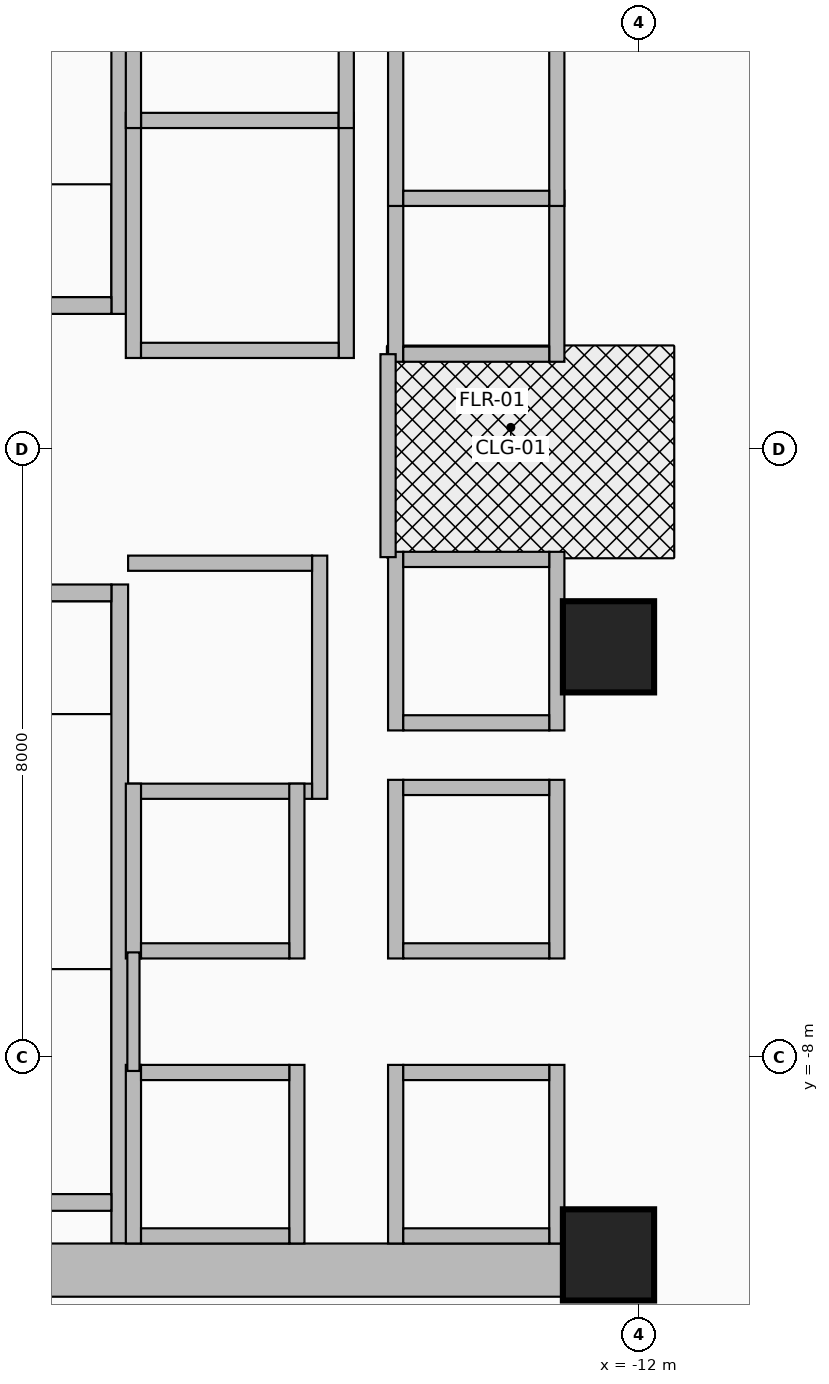
"""IFC4 building model, lengths in metres.
Left out: names, types, materials, properties, quantities, classifications, styles, units other than length and angle.
Written with IfcOpenShell. Run it as: python <this file> out.ifc"""

import sys

from ifc_helpers import new_model, si_unit, direction, frame, frame_2d, origin, origin_2d, place, context, subcontext, project, spatial, rectangle, extrude, source, transform, mapped, element, fill, save


model = new_model("IFC4")
c1 = context("Model", 3, precision=1e-05, world=origin(), true_north=direction((0.0, 1.0)))
c2 = subcontext(c1, "Body", "Model", "MODEL_VIEW")
j1 = project(units=[si_unit("LENGTHUNIT", "METRE"), si_unit("PLANEANGLEUNIT", "RADIAN")], contexts=[c1])
p1 = place(None, origin())
s1 = spatial("IfcSite", under=j1, at=p1, CompositionType="ELEMENT")
p2 = place(p1, origin())
s2 = spatial("IfcBuilding", under=s1, at=p2, CompositionType="ELEMENT")
p3 = place(p2, frame((0.0, 0.0, 101.1)))
s3 = spatial("IfcBuildingStorey", under=s2, at=p3, CompositionType="ELEMENT", Elevation=101.1)
p4 = place(p3, frame((-18.83, 1.78, 0.0), z_axis=(0.0, 0.0, 1.0), x_axis=(0.0, 1.0, 0.0)))
e1 = element("IfcWall", 1, at=p4, inside=s3, PredefinedType="SHEAR", context=c2, shape_type="SweptSolid", body=[
    extrude(rectangle(XDim=8.67, YDim=0.22, at=frame_2d((4.335, 0.0))), origin(), (0.0, 0.0, 1.0), 4.36),
])
p5 = place(p3, frame((-22.05, 1.89, 0.0), z_axis=(0.0, 0.0, 1.0), x_axis=(1.0, 0.0, 0.0)))
e2 = element("IfcWall", 2, at=p5, inside=s3, PredefinedType="SHEAR", context=c2, shape_type="SweptSolid", body=[
    extrude(rectangle(XDim=3.11, YDim=0.22, at=frame_2d((1.555, 0.0))), origin(), (0.0, 0.0, 1.0), 4.36),
])
p6 = place(p5, frame((1.0, 0.0, 0.0)))
e3 = element("IfcOpeningElement", 3, at=p6, cuts=e2, PredefinedType="OPENING", context=c2, shape_type="SweptSolid", body=[
    extrude(rectangle(XDim=1.1, YDim=2.15, at=frame_2d((0.55, 1.075))), frame((0.0, 0.125, 0.0), z_axis=(0.0, -1.0, 0.0), x_axis=(1.0, 0.0, 0.0)), (0.0, 0.0, 1.0), 0.25),
])
p7 = place(p3, frame((-18.83, -10.45, 0.0), z_axis=(0.0, 0.0, 1.0), x_axis=(0.0, 1.0, 0.0)))
e4 = element("IfcWall", 4, at=p7, inside=s3, PredefinedType="SHEAR", context=c2, shape_type="SweptSolid", body=[
    extrude(rectangle(XDim=8.67, YDim=0.22, at=frame_2d((4.335, 0.0))), origin(), (0.0, 0.0, 1.0), 4.36),
])
p8 = place(p3, frame((-22.05, -9.91, 0.0), z_axis=(0.0, 0.0, 1.0), x_axis=(1.0, 0.0, 0.0)))
e5 = element("IfcWall", 5, at=p8, inside=s3, PredefinedType="SHEAR", context=c2, shape_type="SweptSolid", body=[
    extrude(rectangle(XDim=3.11, YDim=0.22, at=frame_2d((1.555, 0.0))), origin(), (0.0, 0.0, 1.0), 4.36),
])
p9 = place(p3, frame((-22.05, -1.89, 0.0), z_axis=(0.0, 0.0, 1.0), x_axis=(1.0, 0.0, 0.0)))
e6 = element("IfcWall", 6, at=p9, inside=s3, PredefinedType="SHEAR", context=c2, shape_type="SweptSolid", body=[
    extrude(rectangle(XDim=3.11, YDim=0.22, at=frame_2d((1.555, 0.0))), origin(), (0.0, 0.0, 1.0), 4.36),
])
p10 = place(p9, frame((1.0, 0.0, 0.0)))
e7 = element("IfcOpeningElement", 7, at=p10, cuts=e6, PredefinedType="OPENING", context=c2, shape_type="SweptSolid", body=[
    extrude(rectangle(XDim=1.1, YDim=2.15, at=frame_2d((0.55, 1.075))), frame((0.0, 0.125, 0.0), z_axis=(0.0, -1.0, 0.0), x_axis=(1.0, 0.0, 0.0)), (0.0, 0.0, 1.0), 0.25),
])
p11 = place(p3, frame((-22.65, -10.8, 0.0), z_axis=(0.0, 0.0, 1.0), x_axis=(1.0, 0.0, 0.0)))
e8 = element("IfcWall", 8, at=p11, inside=s3, PredefinedType="SHEAR", context=c2, shape_type="SweptSolid", body=[
    extrude(rectangle(XDim=10.25, YDim=0.7, at=frame_2d((5.125, 0.0))), origin(), (0.0, 0.0, 1.0), 4.36),
])
m1 = source(origin(), c2, "Body", "SweptSolid", [
    extrude(rectangle(XDim=1.2, YDim=1.2, at=origin_2d()), origin(), (0.0, 0.0, 1.0), 4.6),
])
for number, where, z_axis, x_axis in (
    (9, (-12.4, -10.6, 0.0), (0.0, 0.0, 1.0), (1.0, 0.0, 0.0)),
    (10, (-12.4, -2.6, 0.0), (0.0, 0.0, 1.0), (1.0, 0.0, 0.0)),
):
    element("IfcColumn", number, at=place(p3, frame(where, z_axis=z_axis, x_axis=x_axis)), inside=s3, PredefinedType="COLUMN", context=c2, shape_type="MappedRepresentation", body=[
        mapped(m1, transform((0.0, 0.0, 0.0), x_axis=(1.0, 0.0, 0.0), y_axis=(0.0, 1.0, 0.0), z_axis=(0.0, 0.0, 1.0), scale=1.0)),
    ])
for number, where, z_axis, x_axis in (
    (11, (-18.65, 1.2, 0.0), (0.0, 0.0, 1.0), (0.0, 1.0, 0.0)),
    (12, (-15.85, 1.2, 0.0), (0.0, 0.0, 1.0), (0.0, 1.0, 0.0)),
):
    element("IfcWall", number, at=place(p3, frame(where, z_axis=z_axis, x_axis=x_axis)), inside=s3, PredefinedType="MOVABLE", context=c2, shape_type="SweptSolid", body=[
        extrude(rectangle(XDim=3.225, YDim=0.2, at=frame_2d((1.613, 0.0))), origin(), (0.0, 0.0, 1.0), 4.36),
    ])
p12 = place(p3, frame((-18.55, 1.3, 0.0), z_axis=(0.0, 0.0, 1.0), x_axis=(1.0, 0.0, 0.0)))
e13 = element("IfcWall", 13, at=p12, inside=s3, PredefinedType="MOVABLE", context=c2, shape_type="SweptSolid", body=[
    extrude(rectangle(XDim=2.6, YDim=0.2, at=frame_2d((1.3, 0.0))), origin(), (0.0, 0.0, 1.0), 4.36),
])
p13 = place(p12, frame((0.7, 0.0, 0.0)))
e14 = element("IfcOpeningElement", 14, at=p13, cuts=e13, PredefinedType="OPENING", context=c2, shape_type="SweptSolid", body=[
    extrude(rectangle(XDim=1.2, YDim=2.1, at=frame_2d((0.6, 1.05))), frame((0.0, 0.115, 0.0), z_axis=(0.0, -1.0, 0.0), x_axis=(1.0, 0.0, 0.0)), (0.0, 0.0, 1.0), 0.23),
])
p14 = place(p3, frame((-18.55, 4.325, 0.0), z_axis=(0.0, 0.0, 1.0), x_axis=(1.0, 0.0, 0.0)))
e15 = element("IfcWall", 15, at=p14, inside=s3, PredefinedType="MOVABLE", context=c2, shape_type="SweptSolid", body=[
    extrude(rectangle(XDim=2.6, YDim=0.2, at=frame_2d((1.3, 0.0))), origin(), (0.0, 0.0, 1.0), 4.36),
])
p15 = place(p3, frame((-16.2, -4.6, 0.0), z_axis=(0.0, 0.0, 1.0), x_axis=(0.0, 1.0, 0.0)))
e16 = element("IfcWall", 16, at=p15, inside=s3, PredefinedType="MOVABLE", context=c2, shape_type="SweptSolid", body=[
    extrude(rectangle(XDim=3.2, YDim=0.2, at=frame_2d((1.6, 0.0))), origin(), (0.0, 0.0, 1.0), 4.36),
])
p16 = place(p3, frame((-18.72, -4.5, 0.0), z_axis=(0.0, 0.0, 1.0), x_axis=(1.0, 0.0, 0.0)))
e17 = element("IfcWall", 17, at=p16, inside=s3, PredefinedType="MOVABLE", context=c2, shape_type="SweptSolid", body=[
    extrude(rectangle(XDim=2.42, YDim=0.2, at=frame_2d((1.21, 0.0))), origin(), (0.0, 0.0, 1.0), 4.36),
])
p17 = place(p3, frame((-18.72, -1.5, 0.0), z_axis=(0.0, 0.0, 1.0), x_axis=(1.0, 0.0, 0.0)))
e18 = element("IfcWall", 18, at=p17, inside=s3, PredefinedType="MOVABLE", context=c2, shape_type="SweptSolid", body=[
    extrude(rectangle(XDim=2.42, YDim=0.2, at=frame_2d((1.21, 0.0))), origin(), (0.0, 0.0, 1.0), 4.36),
])
p18 = place(p17, frame((0.61, 0.0, 0.0)))
e19 = element("IfcOpeningElement", 19, at=p18, cuts=e18, PredefinedType="OPENING", context=c2, shape_type="SweptSolid", body=[
    extrude(rectangle(XDim=1.2, YDim=2.1, at=frame_2d((0.6, 1.05))), frame((0.0, 0.115, 0.0), z_axis=(0.0, -1.0, 0.0), x_axis=(1.0, 0.0, 0.0)), (0.0, 0.0, 1.0), 0.23),
])
for number, where, z_axis, x_axis in (
    (20, (-18.65, 4.225, 0.0), (0.0, 0.0, 1.0), (0.0, 1.0, 0.0)),
    (21, (-15.85, 4.225, 0.0), (0.0, 0.0, 1.0), (0.0, 1.0, 0.0)),
):
    element("IfcWall", number, at=place(p3, frame(where, z_axis=z_axis, x_axis=x_axis)), inside=s3, PredefinedType="MOVABLE", context=c2, shape_type="SweptSolid", body=[
        extrude(rectangle(XDim=3.325, YDim=0.2, at=frame_2d((1.663, 0.0))), origin(), (0.0, 0.0, 1.0), 4.36),
    ])
for number, where, z_axis, x_axis in (
    (22, (-15.2, -10.45, 0.0), (0.0, 0.0, 1.0), (0.0, 1.0, 0.0)),
    (23, (-13.08, -10.45, 0.0), (0.0, 0.0, 1.0), (0.0, 1.0, 0.0)),
):
    element("IfcWall", number, at=place(p3, frame(where, z_axis=z_axis, x_axis=x_axis)), inside=s3, PredefinedType="MOVABLE", context=c2, shape_type="SweptSolid", body=[
        extrude(rectangle(XDim=2.35, YDim=0.2, at=frame_2d((1.175, 0.0))), origin(), (0.0, 0.0, 1.0), 3.566),
    ])
p19 = place(p3, frame((-15.1, -10.35, 0.0), z_axis=(0.0, 0.0, 1.0), x_axis=(1.0, 0.0, 0.0)))
e24 = element("IfcWall", 24, at=p19, inside=s3, PredefinedType="MOVABLE", context=c2, shape_type="SweptSolid", body=[
    extrude(rectangle(XDim=1.92, YDim=0.2, at=frame_2d((0.96, 0.0))), origin(), (0.0, 0.0, 1.0), 3.566),
])
p20 = place(p3, frame((-15.1, -8.2, 0.0), z_axis=(0.0, 0.0, 1.0), x_axis=(1.0, 0.0, 0.0)))
e25 = element("IfcWall", 25, at=p20, inside=s3, PredefinedType="MOVABLE", context=c2, shape_type="SweptSolid", body=[
    extrude(rectangle(XDim=1.92, YDim=0.2, at=frame_2d((0.96, 0.0))), origin(), (0.0, 0.0, 1.0), 4.36),
])
p21 = place(p20, frame((0.41, 0.0, 0.0)))
e26 = element("IfcOpeningElement", 26, at=p21, cuts=e25, PredefinedType="OPENING", context=c2, shape_type="SweptSolid", body=[
    extrude(rectangle(XDim=1.1, YDim=2.1, at=frame_2d((0.55, 1.05))), frame((0.0, 0.115, 0.0), z_axis=(0.0, -1.0, 0.0), x_axis=(1.0, 0.0, 0.0)), (0.0, 0.0, 1.0), 0.23),
])
for number, where, z_axis, x_axis in (
    (27, (-15.2, -6.7, 0.0), (0.0, 0.0, 1.0), (0.0, 1.0, 0.0)),
    (28, (-13.08, -6.7, 0.0), (0.0, 0.0, 1.0), (0.0, 1.0, 0.0)),
):
    element("IfcWall", number, at=place(p3, frame(where, z_axis=z_axis, x_axis=x_axis)), inside=s3, PredefinedType="MOVABLE", context=c2, shape_type="SweptSolid", body=[
        extrude(rectangle(XDim=2.35, YDim=0.2, at=frame_2d((1.175, 0.0))), origin(), (0.0, 0.0, 1.0), 4.36),
    ])
p22 = place(p3, frame((-15.1, -6.6, 0.0), z_axis=(0.0, 0.0, 1.0), x_axis=(1.0, 0.0, 0.0)))
e29 = element("IfcWall", 29, at=p22, inside=s3, PredefinedType="MOVABLE", context=c2, shape_type="SweptSolid", body=[
    extrude(rectangle(XDim=1.92, YDim=0.2, at=frame_2d((0.96, 0.0))), origin(), (0.0, 0.0, 1.0), 4.36),
])
p23 = place(p22, frame((0.41, 0.0, 0.0)))
e30 = element("IfcOpeningElement", 30, at=p23, cuts=e29, PredefinedType="OPENING", context=c2, shape_type="SweptSolid", body=[
    extrude(rectangle(XDim=1.1, YDim=2.1, at=frame_2d((0.55, 1.05))), frame((0.0, 0.115, 0.0), z_axis=(0.0, -1.0, 0.0), x_axis=(1.0, 0.0, 0.0)), (0.0, 0.0, 1.0), 0.23),
])
p24 = place(p3, frame((-15.1, -4.45, 0.0), z_axis=(0.0, 0.0, 1.0), x_axis=(1.0, 0.0, 0.0)))
e31 = element("IfcWall", 31, at=p24, inside=s3, PredefinedType="MOVABLE", context=c2, shape_type="SweptSolid", body=[
    extrude(rectangle(XDim=1.92, YDim=0.2, at=frame_2d((0.96, 0.0))), origin(), (0.0, 0.0, 1.0), 4.36),
])
for number, where, z_axis, x_axis in (
    (32, (-18.65, -10.45, 0.0), (0.0, 0.0, 1.0), (0.0, 1.0, 0.0)),
    (33, (-16.5, -10.45, 0.0), (0.0, 0.0, 1.0), (0.0, 1.0, 0.0)),
):
    element("IfcWall", number, at=place(p3, frame(where, z_axis=z_axis, x_axis=x_axis)), inside=s3, PredefinedType="MOVABLE", context=c2, shape_type="SweptSolid", body=[
        extrude(rectangle(XDim=2.35, YDim=0.2, at=frame_2d((1.175, 0.0))), origin(), (0.0, 0.0, 1.0), 3.566),
    ])
p25 = place(p3, frame((-18.55, -10.35, 0.0), z_axis=(0.0, 0.0, 1.0), x_axis=(1.0, 0.0, 0.0)))
e34 = element("IfcWall", 34, at=p25, inside=s3, PredefinedType="MOVABLE", context=c2, shape_type="SweptSolid", body=[
    extrude(rectangle(XDim=1.95, YDim=0.2, at=frame_2d((0.975, 0.0))), origin(), (0.0, 0.0, 1.0), 3.566),
])
p26 = place(p3, frame((-18.55, -8.2, 0.0), z_axis=(0.0, 0.0, 1.0), x_axis=(1.0, 0.0, 0.0)))
e35 = element("IfcWall", 35, at=p26, inside=s3, PredefinedType="MOVABLE", context=c2, shape_type="SweptSolid", body=[
    extrude(rectangle(XDim=1.95, YDim=0.2, at=frame_2d((0.975, 0.0))), origin(), (0.0, 0.0, 1.0), 4.36),
])
p27 = place(p26, frame((0.425, 0.0, 0.0)))
e36 = element("IfcOpeningElement", 36, at=p27, cuts=e35, PredefinedType="OPENING", context=c2, shape_type="SweptSolid", body=[
    extrude(rectangle(XDim=1.1, YDim=2.1, at=frame_2d((0.55, 1.05))), frame((0.0, 0.115, 0.0), z_axis=(0.0, -1.0, 0.0), x_axis=(1.0, 0.0, 0.0)), (0.0, 0.0, 1.0), 0.23),
])
p28 = place(p3, frame((-15.2, 1.15, 0.0), z_axis=(0.0, 0.0, 1.0), x_axis=(0.0, 1.0, 0.0)))
e37 = element("IfcWall", 37, at=p28, inside=s3, PredefinedType="MOVABLE", context=c2, shape_type="SweptSolid", body=[
    extrude(rectangle(XDim=2.25, YDim=0.2, at=frame_2d((1.125, 0.0))), origin(), (0.0, 0.0, 1.0), 4.36),
])
p29 = place(p3, frame((-13.08, 1.15, 0.0), z_axis=(0.0, 0.0, 1.0), x_axis=(0.0, 1.0, 0.0)))
e38 = element("IfcWall", 38, at=p29, inside=s3, PredefinedType="MOVABLE", context=c2, shape_type="SweptSolid", body=[
    extrude(rectangle(XDim=2.25, YDim=0.2, at=frame_2d((1.125, 0.0))), origin(), (0.0, 0.0, 1.0), 4.36),
])
p30 = place(p29, frame((0.575, 0.0, 0.0)))
e39 = element("IfcOpeningElement", 39, at=p30, cuts=e38, PredefinedType="OPENING", context=c2, shape_type="SweptSolid", body=[
    extrude(rectangle(XDim=1.1, YDim=2.1, at=frame_2d((0.55, 1.05))), frame((0.0, 0.115, 0.0), z_axis=(0.0, -1.0, 0.0), x_axis=(1.0, 0.0, 0.0)), (0.0, 0.0, 1.0), 0.23),
])
p31 = place(p3, frame((-15.1, 1.25, 0.0), z_axis=(0.0, 0.0, 1.0), x_axis=(1.0, 0.0, 0.0)))
e40 = element("IfcWall", 40, at=p31, inside=s3, PredefinedType="MOVABLE", context=c2, shape_type="SweptSolid", body=[
    extrude(rectangle(XDim=1.92, YDim=0.2, at=frame_2d((0.96, 0.0))), origin(), (0.0, 0.0, 1.0), 4.36),
])
p32 = place(p3, frame((-15.2, 3.2, 0.0), z_axis=(0.0, 0.0, 1.0), x_axis=(0.0, 1.0, 0.0)))
e41 = element("IfcWall", 41, at=p32, inside=s3, PredefinedType="MOVABLE", context=c2, shape_type="SweptSolid", body=[
    extrude(rectangle(XDim=2.25, YDim=0.2, at=frame_2d((1.125, 0.0))), origin(), (0.0, 0.0, 1.0), 4.36),
])
p33 = place(p3, frame((-13.08, 3.2, 0.0), z_axis=(0.0, 0.0, 1.0), x_axis=(0.0, 1.0, 0.0)))
e42 = element("IfcWall", 42, at=p33, inside=s3, PredefinedType="MOVABLE", context=c2, shape_type="SweptSolid", body=[
    extrude(rectangle(XDim=2.25, YDim=0.2, at=frame_2d((1.125, 0.0))), origin(), (0.0, 0.0, 1.0), 4.36),
])
p34 = place(p33, frame((0.575, 0.0, 0.0)))
e43 = element("IfcOpeningElement", 43, at=p34, cuts=e42, PredefinedType="OPENING", context=c2, shape_type="SweptSolid", body=[
    extrude(rectangle(XDim=1.1, YDim=2.1, at=frame_2d((0.55, 1.05))), frame((0.0, 0.115, 0.0), z_axis=(0.0, -1.0, 0.0), x_axis=(1.0, 0.0, 0.0)), (0.0, 0.0, 1.0), 0.23),
])
p35 = place(p3, frame((-15.1, 3.3, 0.0), z_axis=(0.0, 0.0, 1.0), x_axis=(1.0, 0.0, 0.0)))
e44 = element("IfcWall", 44, at=p35, inside=s3, PredefinedType="MOVABLE", context=c2, shape_type="SweptSolid", body=[
    extrude(rectangle(XDim=1.92, YDim=0.2, at=frame_2d((0.96, 0.0))), origin(), (0.0, 0.0, 1.0), 4.36),
])
for number, where, z_axis, x_axis in (
    (45, (-18.65, -6.7, 0.0), (0.0, 0.0, 1.0), (0.0, 1.0, 0.0)),
    (46, (-16.5, -6.7, 0.0), (0.0, 0.0, 1.0), (0.0, 1.0, 0.0)),
):
    element("IfcWall", number, at=place(p3, frame(where, z_axis=z_axis, x_axis=x_axis)), inside=s3, PredefinedType="MOVABLE", context=c2, shape_type="SweptSolid", body=[
        extrude(rectangle(XDim=2.3, YDim=0.2, at=frame_2d((1.15, 0.0))), origin(), (0.0, 0.0, 1.0), 4.36),
    ])
p36 = place(p3, frame((-18.55, -6.6, 0.0), z_axis=(0.0, 0.0, 1.0), x_axis=(1.0, 0.0, 0.0)))
e47 = element("IfcWall", 47, at=p36, inside=s3, PredefinedType="MOVABLE", context=c2, shape_type="SweptSolid", body=[
    extrude(rectangle(XDim=1.95, YDim=0.2, at=frame_2d((0.975, 0.0))), origin(), (0.0, 0.0, 1.0), 4.36),
])
p37 = place(p36, frame((0.425, 0.0, 0.0)))
e48 = element("IfcOpeningElement", 48, at=p37, cuts=e47, PredefinedType="OPENING", context=c2, shape_type="SweptSolid", body=[
    extrude(rectangle(XDim=1.1, YDim=2.1, at=frame_2d((0.55, 1.05))), frame((0.0, 0.115, 0.0), z_axis=(0.0, -1.0, 0.0), x_axis=(1.0, 0.0, 0.0)), (0.0, 0.0, 1.0), 0.23),
])
for number, where, z_axis, x_axis in (
    (49, (-15.2, -3.7, 0.0), (0.0, 0.0, 1.0), (0.0, 1.0, 0.0)),
    (50, (-13.08, -3.7, 0.0), (0.0, 0.0, 1.0), (0.0, 1.0, 0.0)),
):
    element("IfcWall", number, at=place(p3, frame(where, z_axis=z_axis, x_axis=x_axis)), inside=s3, PredefinedType="MOVABLE", context=c2, shape_type="SweptSolid", body=[
        extrude(rectangle(XDim=2.35, YDim=0.2, at=frame_2d((1.175, 0.0))), origin(), (0.0, 0.0, 1.0), 4.36),
    ])
p38 = place(p3, frame((-15.1, -3.6, 0.0), z_axis=(0.0, 0.0, 1.0), x_axis=(1.0, 0.0, 0.0)))
e51 = element("IfcWall", 51, at=p38, inside=s3, PredefinedType="MOVABLE", context=c2, shape_type="SweptSolid", body=[
    extrude(rectangle(XDim=1.92, YDim=0.2, at=frame_2d((0.96, 0.0))), origin(), (0.0, 0.0, 1.0), 4.36),
])
p39 = place(p3, frame((-15.1, -1.45, 0.0), z_axis=(0.0, 0.0, 1.0), x_axis=(1.0, 0.0, 0.0)))
e52 = element("IfcWall", 52, at=p39, inside=s3, PredefinedType="MOVABLE", context=c2, shape_type="SweptSolid", body=[
    extrude(rectangle(XDim=1.92, YDim=0.2, at=frame_2d((0.96, 0.0))), origin(), (0.0, 0.0, 1.0), 4.36),
])
p40 = place(p39, frame((0.41, 0.0, 0.0)))
e53 = element("IfcOpeningElement", 53, at=p40, cuts=e52, PredefinedType="OPENING", context=c2, shape_type="SweptSolid", body=[
    extrude(rectangle(XDim=1.1, YDim=2.1, at=frame_2d((0.55, 1.05))), frame((0.0, 0.115, 0.0), z_axis=(0.0, -1.0, 0.0), x_axis=(1.0, 0.0, 0.0)), (0.0, 0.0, 1.0), 0.23),
])
p41 = place(p3, frame((-15.3, -1.42, 0.0), z_axis=(0.0, 0.0, 1.0), x_axis=(0.0, 1.0, 0.0)))
e54 = element("IfcWall", 54, at=p41, inside=s3, PredefinedType="PARTITIONING", context=c2, shape_type="SweptSolid", body=[
    extrude(rectangle(XDim=2.67, YDim=0.2, at=frame_2d((1.335, 0.0))), origin(), (0.0, 0.0, 1.0), 4.36),
])
p42 = place(p41, frame((0.78, 0.0, 0.0)))
e55 = element("IfcOpeningElement", 55, at=p42, cuts=e54, PredefinedType="OPENING", context=c2, shape_type="SweptSolid", body=[
    extrude(rectangle(XDim=1.05, YDim=2.15, at=frame_2d((0.525, 1.075))), frame((0.0, 0.115, 0.0), z_axis=(0.0, -1.0, 0.0), x_axis=(1.0, 0.0, 0.0)), (0.0, 0.0, 1.0), 0.23),
])
p43 = place(p3, frame((-18.65, -8.18, 0.0), z_axis=(0.0, 0.0, 1.0), x_axis=(0.0, 1.0, 0.0)))
e56 = element("IfcWall", 56, at=p43, inside=s3, PredefinedType="PARTITIONING", context=c2, shape_type="SweptSolid", body=[
    extrude(rectangle(XDim=1.56, YDim=0.16, at=frame_2d((0.78, 0.0))), origin(), (0.0, 0.0, 1.0), 4.36),
])
p44 = place(p13, origin())
e57 = element("IfcDoor", 57, at=p44, inside=s3, OperationType="DOUBLE_DOOR_SLIDING", PredefinedType="DOOR", context=c2, shape_type="SweptSolid", body=[
    extrude(rectangle(XDim=1.2, YDim=2.1, at=frame_2d((0.6, 1.05))), frame((0.0, 0.025, 0.0), z_axis=(0.0, -1.0, 0.0), x_axis=(1.0, 0.0, 0.0)), (0.0, 0.0, 1.0), 0.05),
])
fill(e14, e57)
p45 = place(p18, origin())
e58 = element("IfcDoor", 58, at=p45, inside=s3, OperationType="DOUBLE_DOOR_SLIDING", PredefinedType="DOOR", context=c2, shape_type="SweptSolid", body=[
    extrude(rectangle(XDim=1.2, YDim=2.1, at=frame_2d((0.6, 1.05))), frame((0.0, 0.025, 0.0), z_axis=(0.0, -1.0, 0.0), x_axis=(1.0, 0.0, 0.0)), (0.0, 0.0, 1.0), 0.05),
])
fill(e19, e58)
p46 = place(p21, origin())
e59 = element("IfcDoor", 59, at=p46, inside=s3, OperationType="DOUBLE_DOOR_SLIDING", PredefinedType="DOOR", context=c2, shape_type="SweptSolid", body=[
    extrude(rectangle(XDim=1.1, YDim=2.1, at=frame_2d((0.55, 1.05))), frame((0.0, 0.025, 0.0), z_axis=(0.0, -1.0, 0.0), x_axis=(1.0, 0.0, 0.0)), (0.0, 0.0, 1.0), 0.05),
])
fill(e26, e59)
p47 = place(p23, origin())
e60 = element("IfcDoor", 60, at=p47, inside=s3, OperationType="DOUBLE_DOOR_SLIDING", PredefinedType="DOOR", context=c2, shape_type="SweptSolid", body=[
    extrude(rectangle(XDim=1.1, YDim=2.1, at=frame_2d((0.55, 1.05))), frame((0.0, 0.025, 0.0), z_axis=(0.0, -1.0, 0.0), x_axis=(1.0, 0.0, 0.0)), (0.0, 0.0, 1.0), 0.05),
])
fill(e30, e60)
p48 = place(p27, origin())
e61 = element("IfcDoor", 61, at=p48, inside=s3, OperationType="DOUBLE_DOOR_SLIDING", PredefinedType="DOOR", context=c2, shape_type="SweptSolid", body=[
    extrude(rectangle(XDim=1.1, YDim=2.1, at=frame_2d((0.55, 1.05))), frame((0.0, 0.025, 0.0), z_axis=(0.0, -1.0, 0.0), x_axis=(1.0, 0.0, 0.0)), (0.0, 0.0, 1.0), 0.05),
])
fill(e36, e61)
p49 = place(p30, origin())
e62 = element("IfcDoor", 62, at=p49, inside=s3, OperationType="DOUBLE_DOOR_SLIDING", PredefinedType="DOOR", context=c2, shape_type="SweptSolid", body=[
    extrude(rectangle(XDim=1.1, YDim=2.1, at=frame_2d((0.55, 1.05))), frame((0.0, 0.025, 0.0), z_axis=(0.0, -1.0, 0.0), x_axis=(1.0, 0.0, 0.0)), (0.0, 0.0, 1.0), 0.05),
])
fill(e39, e62)
p50 = place(p34, origin())
e63 = element("IfcDoor", 63, at=p50, inside=s3, OperationType="DOUBLE_DOOR_SLIDING", PredefinedType="DOOR", context=c2, shape_type="SweptSolid", body=[
    extrude(rectangle(XDim=1.1, YDim=2.1, at=frame_2d((0.55, 1.05))), frame((0.0, 0.025, 0.0), z_axis=(0.0, -1.0, 0.0), x_axis=(1.0, 0.0, 0.0)), (0.0, 0.0, 1.0), 0.05),
])
fill(e43, e63)
p51 = place(p37, origin())
e64 = element("IfcDoor", 64, at=p51, inside=s3, OperationType="DOUBLE_DOOR_SLIDING", PredefinedType="DOOR", context=c2, shape_type="SweptSolid", body=[
    extrude(rectangle(XDim=1.1, YDim=2.1, at=frame_2d((0.55, 1.05))), frame((0.0, 0.025, 0.0), z_axis=(0.0, -1.0, 0.0), x_axis=(1.0, 0.0, 0.0)), (0.0, 0.0, 1.0), 0.05),
])
fill(e48, e64)
p52 = place(p40, origin())
e65 = element("IfcDoor", 65, at=p52, inside=s3, OperationType="DOUBLE_DOOR_SLIDING", PredefinedType="DOOR", context=c2, shape_type="SweptSolid", body=[
    extrude(rectangle(XDim=1.1, YDim=2.1, at=frame_2d((0.55, 1.05))), frame((0.0, 0.025, 0.0), z_axis=(0.0, -1.0, 0.0), x_axis=(1.0, 0.0, 0.0)), (0.0, 0.0, 1.0), 0.05),
])
fill(e53, e65)
p53 = place(p42, origin())
e66 = element("IfcDoor", 66, at=p53, inside=s3, OperationType="SINGLE_SWING_RIGHT", PredefinedType="DOOR", context=c2, shape_type="SweptSolid", body=[
    extrude(rectangle(XDim=1.05, YDim=2.15, at=frame_2d((0.525, 1.075))), frame((0.0, 0.025, 0.0), z_axis=(0.0, -1.0, 0.0), x_axis=(1.0, 0.0, 0.0)), (0.0, 0.0, 1.0), 0.05),
])
fill(e55, e66)
save(model, sys.argv[1])
